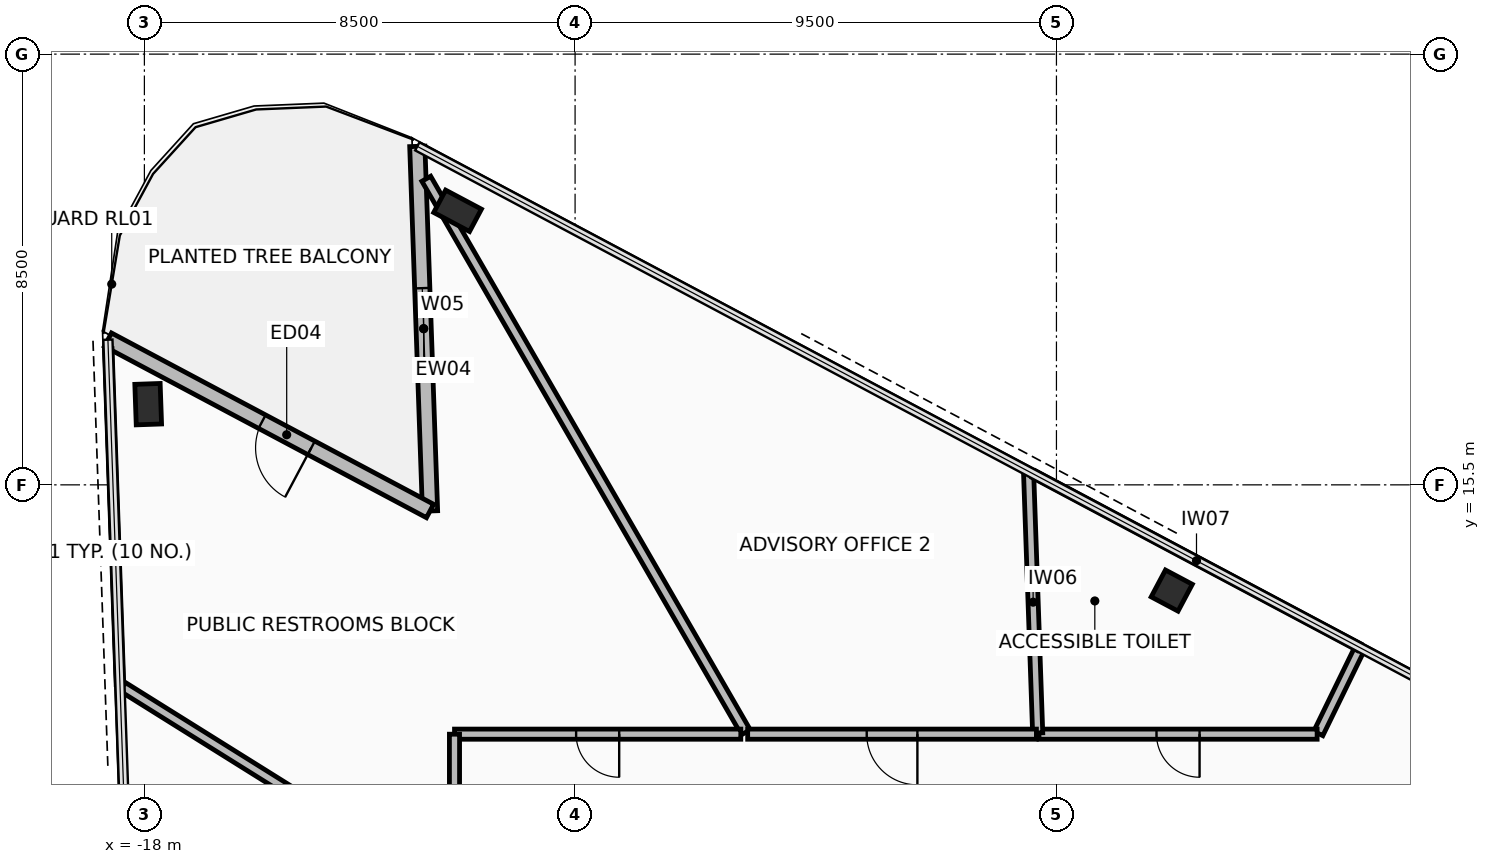
"""IFC4 building model, lengths in metres.
Left out: names, types, materials, properties, quantities, classifications, styles, units other than length and angle.
Written with IfcOpenShell. Run it as: python <this file> out.ifc"""

import sys

from ifc_helpers import new_model, si_unit, direction, frame, frame_2d, origin, origin_2d, place, context, subcontext, project, spatial, rectangle, hollow_rectangle, extrude, element, fill, save


model = new_model("IFC4")
c1 = context("Model", 3, precision=1e-05, world=origin(), true_north=direction((0.0, 1.0)))
c2 = subcontext(c1, "Body", "Model", "MODEL_VIEW")
j1 = project(units=[si_unit("LENGTHUNIT", "METRE"), si_unit("PLANEANGLEUNIT", "RADIAN")], contexts=[c1])
p1 = place(None, origin())
s1 = spatial("IfcSite", under=j1, at=p1, CompositionType="ELEMENT")
p2 = place(p1, origin())
s2 = spatial("IfcBuilding", under=s1, at=p2, CompositionType="ELEMENT")
p3 = place(p2, frame((0.0, 0.0, 149.6)))
s3 = spatial("IfcBuildingStorey", under=s2, at=p3, CompositionType="ELEMENT", Elevation=149.6)
p4 = place(p3, frame((-17.925, 17.092, 0.0), z_axis=(0.0, 0.0, 1.0), x_axis=(-0.034899496703, 0.999390827019, 0.0)))
e1 = element("IfcColumn", 1, at=p4, inside=s3, PredefinedType="COLUMN", context=c2, shape_type="SweptSolid", body=[
    extrude(hollow_rectangle(XDim=0.5, YDim=0.8, WallThickness=0.04, at=origin_2d()), origin(), (0.0, 0.0, 1.0), 3.6),
])
p5 = place(p3, frame((2.276, 13.414, 0.0), z_axis=(0.0, 0.0, 1.0), x_axis=(-0.88294841224, 0.469470021751, 0.0)))
e2 = element("IfcColumn", 2, at=p5, inside=s3, PredefinedType="COLUMN", context=c2, shape_type="SweptSolid", body=[
    extrude(hollow_rectangle(XDim=0.6, YDim=0.6, WallThickness=0.036, at=origin_2d()), origin(), (0.0, 0.0, 1.0), 3.6),
])
p6 = place(p3, frame((-11.819, 20.908, 0.0), z_axis=(0.0, 0.0, 1.0), x_axis=(-0.88294841224, 0.469470021751, 0.0)))
e3 = element("IfcColumn", 3, at=p6, inside=s3, PredefinedType="COLUMN", context=c2, shape_type="SweptSolid", body=[
    extrude(hollow_rectangle(XDim=0.5, YDim=0.8, WallThickness=0.04, at=origin_2d()), origin(), (0.0, 0.0, 1.0), 3.6),
])
p7 = place(p3, frame((-12.614, 22.18, 0.0), z_axis=(0.0, 0.0, 1.0), x_axis=(0.034925918675, -0.999389903994, 0.0)))
e4 = element("IfcWall", 4, at=p7, inside=s3, PredefinedType="STANDARD", context=c2, shape_type="SweptSolid", body=[
    extrude(rectangle(XDim=7.2, YDim=0.3, at=frame_2d((3.6, 0.0))), origin(), (0.0, 0.0, 1.0), 2.705),
])
p8 = place(p7, frame((2.8, 0.0, 0.325)))
e5 = element("IfcOpeningElement", 5, at=p8, cuts=e4, PredefinedType="OPENING", context=c2, shape_type="SweptSolid", body=[
    extrude(rectangle(XDim=1.6, YDim=2.2, at=frame_2d((0.8, 1.1))), frame((0.0, 0.16, 0.0), z_axis=(0.0, -1.0, 0.0), x_axis=(1.0, 0.0, 0.0)), (0.0, 0.0, 1.0), 0.32),
])
p9 = place(p3, frame((-12.363, 14.984, 0.0), z_axis=(0.0, 0.0, 1.0), x_axis=(-0.882950149473, 0.469466754463, 0.0)))
e6 = element("IfcWall", 6, at=p9, inside=s3, PredefinedType="STANDARD", context=c2, shape_type="SweptSolid", body=[
    extrude(rectangle(XDim=7.2, YDim=0.3, at=frame_2d((3.6, 0.0))), origin(), (0.0, 0.0, 1.0), 2.705),
])
p10 = place(p9, frame((2.654, 0.0, 0.0)))
e7 = element("IfcOpeningElement", 7, at=p10, cuts=e6, PredefinedType="OPENING", context=c2, shape_type="SweptSolid", body=[
    extrude(rectangle(XDim=1.1, YDim=2.2, at=frame_2d((0.55, 1.1))), frame((0.0, 0.16, 0.0), z_axis=(0.0, -1.0, 0.0), x_axis=(1.0, 0.0, 0.0)), (0.0, 0.0, 1.0), 0.32),
])
p11 = place(p3, frame((5.982, 12.265, 0.0), z_axis=(0.0, 0.0, 1.0), x_axis=(-0.438366708416, -0.898796211025, 0.0)))
e8 = element("IfcWall", 8, at=p11, inside=s3, PredefinedType="PARTITIONING", context=c2, shape_type="SweptSolid", body=[
    extrude(rectangle(XDim=1.859, YDim=0.2, at=frame_2d((0.93, 0.0))), origin(), (0.0, 0.0, 1.0), 2.705),
])
p12 = place(p3, frame((5.145, 10.58, 0.0), z_axis=(0.0, 0.0, 1.0), x_axis=(-1.0, 0.0, 0.0)))
e9 = element("IfcWall", 9, at=p12, inside=s3, PredefinedType="PARTITIONING", context=c2, shape_type="SweptSolid", body=[
    extrude(rectangle(XDim=5.49, YDim=0.2, at=frame_2d((2.745, 0.0))), origin(), (0.0, 0.0, 1.0), 2.855),
])
p13 = place(p12, frame((2.32, 0.0, 0.0)))
e10 = element("IfcOpeningElement", 10, at=p13, cuts=e9, PredefinedType="OPENING", context=c2, shape_type="SweptSolid", body=[
    extrude(rectangle(XDim=0.85, YDim=2.1, at=frame_2d((0.425, 1.05))), frame((0.0, 0.11, 0.0), z_axis=(0.0, -1.0, 0.0), x_axis=(1.0, 0.0, 0.0)), (0.0, 0.0, 1.0), 0.22),
])
p14 = place(p3, frame((-0.37, 10.604, 0.0), z_axis=(0.0, 0.0, 1.0), x_axis=(-0.034885573224, 0.999391313141, 0.0)))
e11 = element("IfcWall", 11, at=p14, inside=s3, PredefinedType="PARTITIONING", context=c2, shape_type="SweptSolid", body=[
    extrude(rectangle(XDim=5.165, YDim=0.2, at=frame_2d((2.583, 0.0))), origin(), (0.0, 0.0, 1.0), 2.705),
])
p15 = place(p3, frame((-0.443, 15.709, 0.0), z_axis=(0.0, 0.0, 1.0), x_axis=(0.882949454016, -0.469468062442, 0.0)))
e12 = element("IfcWall", 12, at=p15, inside=s3, PredefinedType="PARTITIONING", context=c2, shape_type="SweptSolid", body=[
    extrude(rectangle(XDim=7.265, YDim=0.15, at=frame_2d((3.632, 0.0))), origin(), (0.0, 0.0, 1.0), 3.41),
])
p16 = place(p3, frame((-12.437, 21.541, 0.0), z_axis=(0.0, 0.0, 1.0), x_axis=(0.500011201522, -0.866018936486, 0.0)))
e13 = element("IfcWall", 13, at=p16, inside=s3, PredefinedType="PARTITIONING", context=c2, shape_type="SweptSolid", body=[
    extrude(rectangle(XDim=12.613, YDim=0.2, at=frame_2d((6.307, 0.0))), origin(), (0.0, 0.0, 1.0), 2.705),
])
p17 = place(p3, frame((-6.229, 10.58, 0.0), z_axis=(0.0, 0.0, 1.0), x_axis=(-1.0, 0.0, 0.0)))
e14 = element("IfcWall", 14, at=p17, inside=s3, PredefinedType="PARTITIONING", context=c2, shape_type="SweptSolid", body=[
    extrude(rectangle(XDim=5.65, YDim=0.2, at=frame_2d((2.825, 0.0))), origin(), (0.0, 0.0, 1.0), 2.755),
])
p18 = place(p17, frame((2.4, 0.0, 0.0)))
e15 = element("IfcOpeningElement", 15, at=p18, cuts=e14, PredefinedType="OPENING", context=c2, shape_type="SweptSolid", body=[
    extrude(rectangle(XDim=0.85, YDim=2.1, at=frame_2d((0.425, 1.05))), frame((0.0, 0.11, 0.0), z_axis=(0.0, -1.0, 0.0), x_axis=(1.0, 0.0, 0.0)), (0.0, 0.0, 1.0), 0.22),
])
p19 = place(p3, frame((-11.88, 10.579, 0.0), z_axis=(0.0, 0.0, 1.0), x_axis=(0.0, -1.0, 0.0)))
e16 = element("IfcWall", 16, at=p19, inside=s3, PredefinedType="PARTITIONING", context=c2, shape_type="SweptSolid", body=[
    extrude(rectangle(XDim=3.111, YDim=0.2, at=frame_2d((1.555, 0.0))), origin(), (0.0, 0.0, 1.0), 2.855),
])
p20 = place(p3, frame((-11.985, 7.489, 0.0), z_axis=(0.0, 0.0, 1.0), x_axis=(-0.848034171939, 0.529941546988, 0.0)))
e17 = element("IfcWall", 17, at=p20, inside=s3, PredefinedType="PARTITIONING", context=c2, shape_type="SweptSolid", body=[
    extrude(rectangle(XDim=7.647, YDim=0.2, at=frame_2d((3.824, 0.0))), origin(), (0.0, 0.0, 1.0), 2.705),
])
p21 = place(p3, frame((-18.482, 11.562, 0.0), z_axis=(0.0, 0.0, 1.0), x_axis=(-0.034921554499, 0.9993900565, 0.0)))
e18 = element("IfcWall", 18, at=p21, inside=s3, PredefinedType="PARTITIONING", context=c2, shape_type="SweptSolid", body=[
    extrude(rectangle(XDim=6.628, YDim=0.15, at=frame_2d((3.314, 0.0))), origin(), (0.0, 0.0, 1.0), 3.41),
])
p22 = place(p3, frame((-0.395, 10.58, 0.0), z_axis=(0.0, 0.0, 1.0), x_axis=(-1.0, 0.0, 0.0)))
e19 = element("IfcWall", 19, at=p22, inside=s3, PredefinedType="PARTITIONING", context=c2, shape_type="SweptSolid", body=[
    extrude(rectangle(XDim=5.699, YDim=0.2, at=frame_2d((2.849, 0.0))), origin(), (0.0, 0.0, 1.0), 3.41),
])
p23 = place(p22, frame((2.349, 0.0, 0.0)))
e20 = element("IfcOpeningElement", 20, at=p23, cuts=e19, PredefinedType="OPENING", context=c2, shape_type="SweptSolid", body=[
    extrude(rectangle(XDim=1.0, YDim=2.15, at=frame_2d((0.5, 1.075))), frame((0.0, 0.11, 0.0), z_axis=(0.0, -1.0, 0.0), x_axis=(1.0, 0.0, 0.0)), (0.0, 0.0, 1.0), 0.22),
])
p24 = place(p10, origin())
e21 = element("IfcDoor", 21, at=p24, inside=s3, OperationType="SINGLE_SWING_LEFT", PredefinedType="DOOR", context=c2, shape_type="SweptSolid", body=[
    extrude(rectangle(XDim=1.1, YDim=2.2, at=frame_2d((0.55, 1.1))), frame((0.0, 0.025, 0.0), z_axis=(0.0, -1.0, 0.0), x_axis=(1.0, 0.0, 0.0)), (0.0, 0.0, 1.0), 0.05),
])
fill(e7, e21)
p25 = place(p8, origin())
e22 = element("IfcWindow", 22, at=p25, inside=s3, PartitioningType="SINGLE_PANEL", PredefinedType="WINDOW", context=c2, shape_type="SweptSolid", body=[
    extrude(rectangle(XDim=1.6, YDim=2.2, at=frame_2d((0.8, 1.1))), frame((0.0, 0.03, 0.0), z_axis=(0.0, -1.0, 0.0), x_axis=(1.0, 0.0, 0.0)), (0.0, 0.0, 1.0), 0.06),
])
fill(e5, e22)
p26 = place(p13, origin())
e23 = element("IfcDoor", 23, at=p26, inside=s3, OperationType="SINGLE_SWING_RIGHT", PredefinedType="DOOR", context=c2, shape_type="SweptSolid", body=[
    extrude(rectangle(XDim=0.85, YDim=2.1, at=frame_2d((0.425, 1.05))), frame((0.0, 0.025, 0.0), z_axis=(0.0, -1.0, 0.0), x_axis=(1.0, 0.0, 0.0)), (0.0, 0.0, 1.0), 0.05),
])
fill(e10, e23)
p27 = place(p18, origin())
e24 = element("IfcDoor", 24, at=p27, inside=s3, OperationType="SINGLE_SWING_RIGHT", PredefinedType="DOOR", context=c2, shape_type="SweptSolid", body=[
    extrude(rectangle(XDim=0.85, YDim=2.1, at=frame_2d((0.425, 1.05))), frame((0.0, 0.025, 0.0), z_axis=(0.0, -1.0, 0.0), x_axis=(1.0, 0.0, 0.0)), (0.0, 0.0, 1.0), 0.05),
])
fill(e15, e24)
p28 = place(p23, origin())
e25 = element("IfcDoor", 25, at=p28, inside=s3, OperationType="SINGLE_SWING_RIGHT", PredefinedType="DOOR", context=c2, shape_type="SweptSolid", body=[
    extrude(rectangle(XDim=1.0, YDim=2.15, at=frame_2d((0.5, 1.075))), frame((0.0, 0.025, 0.0), z_axis=(0.0, -1.0, 0.0), x_axis=(1.0, 0.0, 0.0)), (0.0, 0.0, 1.0), 0.05),
])
fill(e20, e25)
save(model, sys.argv[1])
